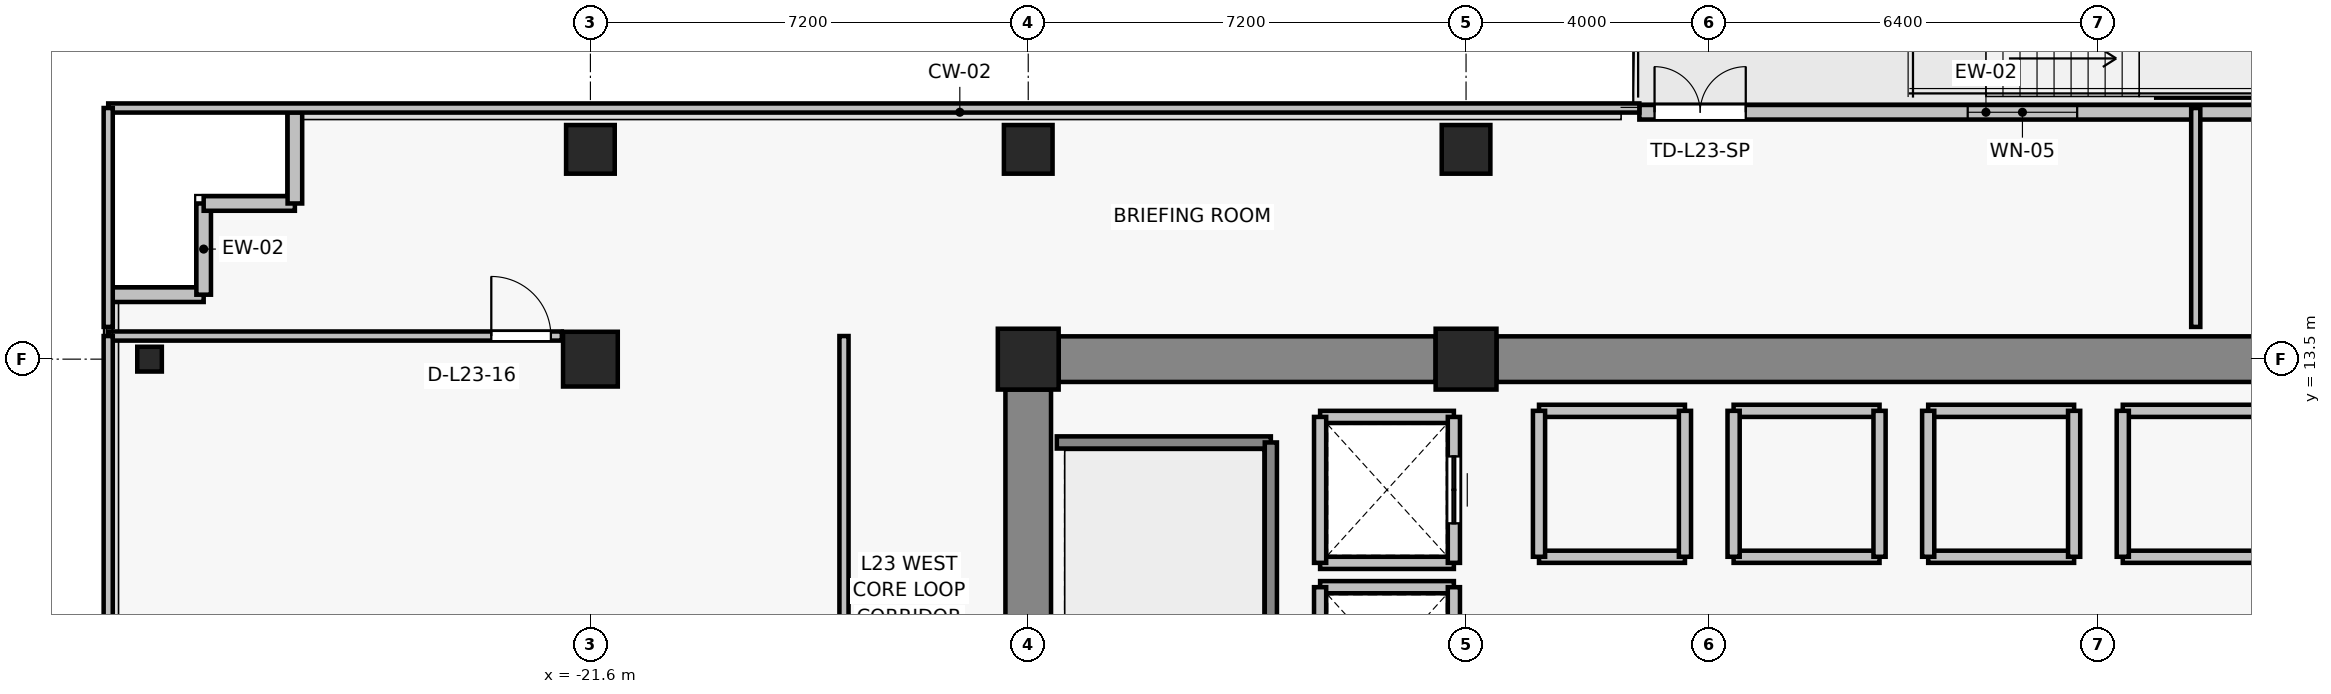
"""IFC4 building model, lengths in metres.
Left out: names, types, materials, properties, quantities, classifications, styles, units other than length and angle.
Written with IfcOpenShell. Run it as: python <this file> out.ifc"""

import sys

from ifc_helpers import new_model, si_unit, direction, frame, frame_2d, origin, origin_2d, place, context, subcontext, project, spatial, rectangle, i_section, extrude, source, transform, mapped, element, fill, save


model = new_model("IFC4")
c1 = context("Model", 3, precision=1e-05, world=origin(), true_north=direction((0.0, 1.0)))
c2 = subcontext(c1, "Body", "Model", "MODEL_VIEW")
j1 = project(units=[si_unit("LENGTHUNIT", "METRE"), si_unit("PLANEANGLEUNIT", "RADIAN")], contexts=[c1])
p1 = place(None, origin())
s1 = spatial("IfcSite", under=j1, at=p1, CompositionType="ELEMENT")
p2 = place(p1, origin())
s2 = spatial("IfcBuilding", under=s1, at=p2, CompositionType="ELEMENT")
p3 = place(p2, frame((0.0, 0.0, 86.8)))
s3 = spatial("IfcBuildingStorey", under=s2, at=p3, CompositionType="ELEMENT", Elevation=86.8)
for number, where, z_axis, x_axis in (
    (1, (-14.4, 13.5, 0.0), (0.0, 0.0, 1.0), (1.0, 0.0, 0.0)),
    (2, (-7.2, 13.5, 0.0), (0.0, 0.0, 1.0), (1.0, 0.0, 0.0)),
):
    element("IfcColumn", number, at=place(p3, frame(where, z_axis=z_axis, x_axis=x_axis)), inside=s3, PredefinedType="COLUMN", context=c2, shape_type="SweptSolid", body=[
        extrude(rectangle(XDim=1.0, YDim=1.0, at=origin_2d()), origin(), (0.0, 0.0, 1.0), 3.3),
    ])
p4 = place(p3, frame((-21.6, 13.5, 0.0), z_axis=(0.0, 0.0, 1.0), x_axis=(1.0, 0.0, 0.0)))
e3 = element("IfcColumn", 3, at=p4, inside=s3, PredefinedType="COLUMN", context=c2, shape_type="SweptSolid", body=[
    extrude(rectangle(XDim=0.9, YDim=0.9, at=origin_2d()), origin(), (0.0, 0.0, 1.0), 3.3),
])
for number, where, z_axis, x_axis in (
    (4, (-14.4, 16.95, 0.0), (0.0, 0.0, 1.0), (1.0, 0.0, 0.0)),
    (5, (-7.2, 16.95, 0.0), (0.0, 0.0, 1.0), (1.0, 0.0, 0.0)),
    (6, (-21.6, 16.95, 0.0), (0.0, 0.0, 1.0), (1.0, 0.0, 0.0)),
):
    element("IfcColumn", number, at=place(p3, frame(where, z_axis=z_axis, x_axis=x_axis)), inside=s3, PredefinedType="COLUMN", context=c2, shape_type="SweptSolid", body=[
        extrude(rectangle(XDim=0.8, YDim=0.8, at=origin_2d()), origin(), (0.0, 0.0, 1.0), 3.3),
    ])
p5 = place(p3, frame((-28.85, 13.5, 0.0), z_axis=(0.0, 0.0, 1.0), x_axis=(1.0, 0.0, 0.0)))
e7 = element("IfcColumn", 7, at=p5, inside=s3, PredefinedType="COLUMN", context=c2, shape_type="SweptSolid", body=[
    extrude(i_section(OverallWidth=0.404, OverallDepth=0.407, WebThickness=0.022, FlangeThickness=0.032, FilletRadius=0.015, at=origin_2d()), origin(), (0.0, 0.0, 1.0), 3.3),
])
p6 = place(p3, frame((-13.9, 13.5, 0.0), z_axis=(0.0, 0.0, 1.0), x_axis=(1.0, 0.0, 0.0)))
e8 = element("IfcWall", 8, at=p6, inside=s3, PredefinedType="SHEAR", context=c2, shape_type="SweptSolid", body=[
    extrude(rectangle(XDim=6.2, YDim=0.75, at=frame_2d((3.1, 0.0))), origin(), (0.0, 0.0, 1.0), 3.075),
])
p7 = place(p3, frame((-6.7, 13.5, 0.0), z_axis=(0.0, 0.0, 1.0), x_axis=(1.0, 0.0, 0.0)))
e9 = element("IfcWall", 9, at=p7, inside=s3, PredefinedType="SHEAR", context=c2, shape_type="SweptSolid", body=[
    extrude(rectangle(XDim=13.4, YDim=0.75, at=frame_2d((6.7, 0.0))), origin(), (0.0, 0.0, 1.0), 3.075),
])
p8 = place(p3, frame((-14.4, 7.1, 0.0), z_axis=(0.0, 0.0, 1.0), x_axis=(0.0, 1.0, 0.0)))
e10 = element("IfcWall", 10, at=p8, inside=s3, PredefinedType="SHEAR", context=c2, shape_type="SweptSolid", body=[
    extrude(rectangle(XDim=5.9, YDim=0.75, at=frame_2d((2.95, 0.0))), origin(), (0.0, 0.0, 1.0), 3.075),
])
p9 = place(p3, frame((-4.35, 17.56, 0.0), z_axis=(0.0, 0.0, 1.0), x_axis=(1.0, 0.0, 0.0)))
e11 = element("IfcWall", 11, at=p9, inside=s3, PredefinedType="SOLIDWALL", context=c2, shape_type="SweptSolid", body=[
    extrude(rectangle(XDim=11.4, YDim=0.24, at=frame_2d((5.7, 0.0))), origin(), (0.0, 0.0, 1.0), 2.59),
])
p10 = place(p9, frame((0.25, 0.0, 0.0)))
e12 = element("IfcOpeningElement", 12, at=p10, cuts=e11, PredefinedType="OPENING", context=c2, shape_type="SweptSolid", body=[
    extrude(rectangle(XDim=1.5, YDim=2.2, at=frame_2d((0.75, 1.1))), frame((0.0, 0.13, 0.0), z_axis=(0.0, -1.0, 0.0), x_axis=(1.0, 0.0, 0.0)), (0.0, 0.0, 1.0), 0.26),
])
p11 = place(p9, frame((5.4, 0.0, 0.85)))
e13 = element("IfcOpeningElement", 13, at=p11, cuts=e11, PredefinedType="OPENING", context=c2, shape_type="SweptSolid", body=[
    extrude(rectangle(XDim=1.8, YDim=1.6, at=frame_2d((0.9, 0.8))), frame((0.0, 0.13, 0.0), z_axis=(0.0, -1.0, 0.0), x_axis=(1.0, 0.0, 0.0)), (0.0, 0.0, 1.0), 0.26),
])
for number, where, z_axis, x_axis in (
    (14, (-27.96, 14.56, 0.0), (0.0, 0.0, 1.0), (-1.0, 0.0, 0.0)),
    (15, (-27.96, 16.06, 0.0), (0.0, 0.0, 1.0), (0.0, -1.0, 0.0)),
    (16, (-26.46, 16.06, 0.0), (0.0, 0.0, 1.0), (-1.0, 0.0, 0.0)),
    (17, (-26.46, 17.56, 0.0), (0.0, 0.0, 1.0), (0.0, -1.0, 0.0)),
):
    element("IfcWall", number, at=place(p3, frame(where, z_axis=z_axis, x_axis=x_axis)), inside=s3, PredefinedType="SOLIDWALL", context=c2, shape_type="SweptSolid", body=[
        extrude(rectangle(XDim=1.5, YDim=0.24, at=frame_2d((0.75, 0.0))), origin(), (0.0, 0.0, 1.0), 3.075),
    ])
p12 = place(p3, frame((4.15, 17.9, -0.25), z_axis=(0.0, 0.0, 1.0), x_axis=(1.0, 0.0, 0.0)))
e18 = element("IfcWall", 18, at=p12, inside=s3, PredefinedType="SOLIDWALL", context=c2, shape_type="SweptSolid", body=[
    extrude(rectangle(XDim=2.33, YDim=0.2, at=frame_2d((1.165, 0.0))), origin(), (0.0, 0.0, 1.0), 1.7),
])
for number, where, z_axis, x_axis in (
    (19, (-3.6, 10.25, 0.0), (0.0, 0.0, 1.0), (-1.0, 0.0, 0.0)),
    (20, (-6.0, 12.65, 0.0), (0.0, 0.0, 1.0), (1.0, 0.0, 0.0)),
):
    element("IfcWall", number, at=place(p3, frame(where, z_axis=z_axis, x_axis=x_axis)), inside=s3, PredefinedType="SOLIDWALL", context=c2, shape_type="SweptSolid", body=[
        extrude(rectangle(XDim=2.4, YDim=0.2, at=frame_2d((1.2, 0.0))), origin(), (0.0, 0.0, 1.0), 2.59),
    ])
for number, where, z_axis, x_axis in (
    (21, (-6.0, 10.25, 0.0), (0.0, 0.0, 1.0), (0.0, 1.0, 0.0)),
    (22, (-3.6, 12.65, 0.0), (0.0, 0.0, 1.0), (0.0, -1.0, 0.0)),
):
    element("IfcWall", number, at=place(p3, frame(where, z_axis=z_axis, x_axis=x_axis)), inside=s3, PredefinedType="SOLIDWALL", context=c2, shape_type="SweptSolid", body=[
        extrude(rectangle(XDim=2.4, YDim=0.2, at=frame_2d((1.2, 0.0))), origin(), (0.0, 0.0, 1.0), 3.075),
    ])
for number, where, z_axis, x_axis in (
    (23, (-0.4, 10.25, 0.0), (0.0, 0.0, 1.0), (-1.0, 0.0, 0.0)),
    (24, (-2.8, 12.65, 0.0), (0.0, 0.0, 1.0), (1.0, 0.0, 0.0)),
):
    element("IfcWall", number, at=place(p3, frame(where, z_axis=z_axis, x_axis=x_axis)), inside=s3, PredefinedType="SOLIDWALL", context=c2, shape_type="SweptSolid", body=[
        extrude(rectangle(XDim=2.4, YDim=0.2, at=frame_2d((1.2, 0.0))), origin(), (0.0, 0.0, 1.0), 3.075),
    ])
for number, where, z_axis, x_axis in (
    (25, (-2.8, 10.25, 0.0), (0.0, 0.0, 1.0), (0.0, 1.0, 0.0)),
    (26, (-0.4, 12.65, 0.0), (0.0, 0.0, 1.0), (0.0, -1.0, 0.0)),
):
    element("IfcWall", number, at=place(p3, frame(where, z_axis=z_axis, x_axis=x_axis)), inside=s3, PredefinedType="SOLIDWALL", context=c2, shape_type="SweptSolid", body=[
        extrude(rectangle(XDim=2.4, YDim=0.2, at=frame_2d((1.2, 0.0))), origin(), (0.0, 0.0, 1.0), 3.075),
    ])
for number, where, z_axis, x_axis in (
    (27, (2.8, 10.25, 0.0), (0.0, 0.0, 1.0), (-1.0, 0.0, 0.0)),
    (28, (0.4, 12.65, 0.0), (0.0, 0.0, 1.0), (1.0, 0.0, 0.0)),
):
    element("IfcWall", number, at=place(p3, frame(where, z_axis=z_axis, x_axis=x_axis)), inside=s3, PredefinedType="SOLIDWALL", context=c2, shape_type="SweptSolid", body=[
        extrude(rectangle(XDim=2.4, YDim=0.2, at=frame_2d((1.2, 0.0))), origin(), (0.0, 0.0, 1.0), 3.075),
    ])
for number, where, z_axis, x_axis in (
    (29, (0.4, 10.25, 0.0), (0.0, 0.0, 1.0), (0.0, 1.0, 0.0)),
    (30, (2.8, 12.65, 0.0), (0.0, 0.0, 1.0), (0.0, -1.0, 0.0)),
    (31, (6.0, 10.25, 0.0), (0.0, 0.0, 1.0), (-1.0, 0.0, 0.0)),
    (32, (3.6, 12.65, 0.0), (0.0, 0.0, 1.0), (1.0, 0.0, 0.0)),
    (33, (3.6, 10.25, 0.0), (0.0, 0.0, 1.0), (0.0, 1.0, 0.0)),
):
    element("IfcWall", number, at=place(p3, frame(where, z_axis=z_axis, x_axis=x_axis)), inside=s3, PredefinedType="SOLIDWALL", context=c2, shape_type="SweptSolid", body=[
        extrude(rectangle(XDim=2.4, YDim=0.2, at=frame_2d((1.2, 0.0))), origin(), (0.0, 0.0, 1.0), 3.075),
    ])
p13 = place(p3, frame((-9.6, 9.75, 0.0), z_axis=(0.0, 0.0, 1.0), x_axis=(1.0, 0.0, 0.0)))
e34 = element("IfcWall", 34, at=p13, inside=s3, PredefinedType="SOLIDWALL", context=c2, shape_type="SweptSolid", body=[
    extrude(rectangle(XDim=2.2, YDim=0.2, at=frame_2d((1.1, 0.0))), origin(), (0.0, 0.0, 1.0), 2.515),
])
p14 = place(p3, frame((-9.6, 7.35, 0.0), z_axis=(0.0, 0.0, 1.0), x_axis=(0.0, 1.0, 0.0)))
e35 = element("IfcWall", 35, at=p14, inside=s3, PredefinedType="SOLIDWALL", context=c2, shape_type="SweptSolid", body=[
    extrude(rectangle(XDim=2.4, YDim=0.2, at=frame_2d((1.2, 0.0))), origin(), (0.0, 0.0, 1.0), 3.075),
])
p15 = place(p3, frame((-7.4, 9.75, 0.0), z_axis=(0.0, 0.0, 1.0), x_axis=(0.0, -1.0, 0.0)))
e36 = element("IfcWall", 36, at=p15, inside=s3, PredefinedType="SOLIDWALL", context=c2, shape_type="SweptSolid", body=[
    extrude(rectangle(XDim=2.4, YDim=0.2, at=frame_2d((1.2, 0.0))), origin(), (0.0, 0.0, 1.0), 2.515),
])
p16 = place(p15, frame((0.65, 0.0, 0.0)))
e37 = element("IfcOpeningElement", 37, at=p16, cuts=e36, PredefinedType="OPENING", context=c2, shape_type="SweptSolid", body=[
    extrude(rectangle(XDim=1.1, YDim=2.2, at=frame_2d((0.55, 1.1))), frame((0.0, 0.11, 0.0), z_axis=(0.0, -1.0, 0.0), x_axis=(1.0, 0.0, 0.0)), (0.0, 0.0, 1.0), 0.22),
])
for number, where, z_axis, x_axis in (
    (38, (-7.4, 10.15, 0.0), (0.0, 0.0, 1.0), (-1.0, 0.0, 0.0)),
    (39, (-9.6, 12.55, 0.0), (0.0, 0.0, 1.0), (1.0, 0.0, 0.0)),
):
    element("IfcWall", number, at=place(p3, frame(where, z_axis=z_axis, x_axis=x_axis)), inside=s3, PredefinedType="SOLIDWALL", context=c2, shape_type="SweptSolid", body=[
        extrude(rectangle(XDim=2.2, YDim=0.2, at=frame_2d((1.1, 0.0))), origin(), (0.0, 0.0, 1.0), 2.515),
    ])
p17 = place(p3, frame((-9.6, 10.15, 0.0), z_axis=(0.0, 0.0, 1.0), x_axis=(0.0, 1.0, 0.0)))
e40 = element("IfcWall", 40, at=p17, inside=s3, PredefinedType="SOLIDWALL", context=c2, shape_type="SweptSolid", body=[
    extrude(rectangle(XDim=2.4, YDim=0.2, at=frame_2d((1.2, 0.0))), origin(), (0.0, 0.0, 1.0), 3.075),
])
p18 = place(p3, frame((-7.4, 12.55, 0.0), z_axis=(0.0, 0.0, 1.0), x_axis=(0.0, -1.0, 0.0)))
e41 = element("IfcWall", 41, at=p18, inside=s3, PredefinedType="SOLIDWALL", context=c2, shape_type="SweptSolid", body=[
    extrude(rectangle(XDim=2.4, YDim=0.2, at=frame_2d((1.2, 0.0))), origin(), (0.0, 0.0, 1.0), 2.515),
])
p19 = place(p18, frame((0.65, 0.0, 0.0)))
e42 = element("IfcOpeningElement", 42, at=p19, cuts=e41, PredefinedType="OPENING", context=c2, shape_type="SweptSolid", body=[
    extrude(rectangle(XDim=1.1, YDim=2.2, at=frame_2d((0.55, 1.1))), frame((0.0, 0.11, 0.0), z_axis=(0.0, -1.0, 0.0), x_axis=(1.0, 0.0, 0.0)), (0.0, 0.0, 1.0), 0.22),
])
p20 = place(p3, frame((-13.93, 12.13, 0.0), z_axis=(0.0, 0.0, 1.0), x_axis=(1.0, 0.0, 0.0)))
e43 = element("IfcWall", 43, at=p20, inside=s3, PredefinedType="SOLIDWALL", context=c2, shape_type="SweptSolid", body=[
    extrude(rectangle(XDim=3.52, YDim=0.2, at=frame_2d((1.76, 0.0))), origin(), (0.0, 0.0, 1.0), 3.075),
])
p21 = place(p3, frame((-10.41, 12.13, 0.0), z_axis=(0.0, 0.0, 1.0), x_axis=(0.0, -1.0, 0.0)))
e44 = element("IfcWall", 44, at=p21, inside=s3, PredefinedType="SOLIDWALL", context=c2, shape_type="SweptSolid", body=[
    extrude(rectangle(XDim=8.84, YDim=0.2, at=frame_2d((4.42, 0.0))), origin(), (0.0, 0.0, 1.0), 3.075),
])
p22 = place(p3, frame((-29.53, 13.88, 0.0), z_axis=(0.0, 0.0, 1.0), x_axis=(1.0, 0.0, 0.0)))
e45 = element("IfcWall", 45, at=p22, inside=s3, PredefinedType="PARTITIONING", context=c2, shape_type="SweptSolid", body=[
    extrude(rectangle(XDim=7.46, YDim=0.15, at=frame_2d((3.73, 0.0))), origin(), (0.0, 0.0, 1.0), 3.075),
])
p23 = place(p22, frame((6.3, 0.0, 0.0)))
e46 = element("IfcOpeningElement", 46, at=p23, cuts=e45, PredefinedType="OPENING", context=c2, shape_type="SweptSolid", body=[
    extrude(rectangle(XDim=0.98, YDim=2.15, at=frame_2d((0.49, 1.075))), frame((0.0, 0.085, 0.0), z_axis=(0.0, -1.0, 0.0), x_axis=(1.0, 0.0, 0.0)), (0.0, 0.0, 1.0), 0.17),
])
p24 = place(p3, frame((-29.53, -1.77, 0.0), z_axis=(0.0, 0.0, 1.0), x_axis=(0.0, 1.0, 0.0)))
e47 = element("IfcWall", 47, at=p24, inside=s3, PredefinedType="PARTITIONING", context=c2, shape_type="SweptSolid", body=[
    extrude(rectangle(XDim=15.65, YDim=0.15, at=frame_2d((7.825, 0.0))), origin(), (0.0, 0.0, 1.0), 3.075),
])
p25 = place(p3, frame((-17.43, 13.88, 0.0), z_axis=(0.0, 0.0, 1.0), x_axis=(0.0, -1.0, 0.0)))
e48 = element("IfcWall", 48, at=p25, inside=s3, PredefinedType="PARTITIONING", context=c2, shape_type="SweptSolid", body=[
    extrude(rectangle(XDim=15.65, YDim=0.15, at=frame_2d((7.825, 0.0))), origin(), (0.0, 0.0, 1.0), 2.515),
])
p26 = place(p25, frame((7.335, 0.0, 0.0)))
e49 = element("IfcOpeningElement", 49, at=p26, cuts=e48, PredefinedType="OPENING", context=c2, shape_type="SweptSolid", body=[
    extrude(rectangle(XDim=0.98, YDim=2.15, at=frame_2d((0.49, 1.075))), frame((0.0, 0.085, 0.0), z_axis=(0.0, -1.0, 0.0), x_axis=(1.0, 0.0, 0.0)), (0.0, 0.0, 1.0), 0.17),
])
p27 = place(p3, frame((-29.53, 17.63, 0.0), z_axis=(0.0, 0.0, 1.0), x_axis=(1.0, 0.0, 0.0)))
e50 = element("IfcWall", 50, at=p27, inside=s3, PredefinedType="PARTITIONING", context=c2, shape_type="SweptSolid", body=[
    extrude(rectangle(XDim=25.18, YDim=0.15, at=frame_2d((12.59, 0.0))), origin(), (0.0, 0.0, 1.0), 2.59),
])
p28 = place(p3, frame((-29.53, 14.03, 0.0), z_axis=(0.0, 0.0, 1.0), x_axis=(0.0, 1.0, 0.0)))
e51 = element("IfcWall", 51, at=p28, inside=s3, PredefinedType="PARTITIONING", context=c2, shape_type="SweptSolid", body=[
    extrude(rectangle(XDim=3.6, YDim=0.15, at=frame_2d((1.8, 0.0))), origin(), (0.0, 0.0, 1.0), 3.075),
])
p29 = place(p3, frame((4.8, 17.63, 0.0), z_axis=(0.0, 0.0, 1.0), x_axis=(0.0, -1.0, 0.0)))
e52 = element("IfcWall", 52, at=p29, inside=s3, PredefinedType="PARTITIONING", context=c2, shape_type="SweptSolid", body=[
    extrude(rectangle(XDim=3.6, YDim=0.15, at=frame_2d((1.8, 0.0))), origin(), (0.0, 0.0, 1.0), 2.565),
])
m1 = source(origin(), c2, "Body", "SweptSolid", [
    extrude(rectangle(XDim=1.5, YDim=2.2, at=frame_2d((0.75, 1.1))), frame((0.0, 0.025, 0.0), z_axis=(0.0, -1.0, 0.0), x_axis=(1.0, 0.0, 0.0)), (0.0, 0.0, 1.0), 0.05),
])
p30 = place(p10, origin())
e53 = element("IfcDoor", 53, at=p30, inside=s3, OperationType="DOUBLE_DOOR_SINGLE_SWING", PredefinedType="DOOR", context=c2, shape_type="MappedRepresentation", body=[
    mapped(m1, transform((0.0, 0.0, 0.0), x_axis=(1.0, 0.0, 0.0), y_axis=(0.0, 1.0, 0.0), z_axis=(0.0, 0.0, 1.0), scale=1.0)),
])
fill(e12, e53)
m2 = source(origin(), c2, "Body", "SweptSolid", [
    extrude(rectangle(XDim=1.8, YDim=1.6, at=frame_2d((0.9, 0.8))), frame((0.0, 0.03, 0.0), z_axis=(0.0, -1.0, 0.0), x_axis=(1.0, 0.0, 0.0)), (0.0, 0.0, 1.0), 0.06),
])
p31 = place(p11, origin())
e54 = element("IfcWindow", 54, at=p31, inside=s3, PartitioningType="SINGLE_PANEL", PredefinedType="WINDOW", context=c2, shape_type="MappedRepresentation", body=[
    mapped(m2, transform((0.0, 0.0, 0.0), x_axis=(1.0, 0.0, 0.0), y_axis=(0.0, 1.0, 0.0), z_axis=(0.0, 0.0, 1.0), scale=1.0)),
])
fill(e13, e54)
m3 = source(origin(), c2, "Body", "SweptSolid", [
    extrude(rectangle(XDim=1.1, YDim=2.2, at=frame_2d((0.55, 1.1))), frame((0.0, 0.025, 0.0), z_axis=(0.0, -1.0, 0.0), x_axis=(1.0, 0.0, 0.0)), (0.0, 0.0, 1.0), 0.05),
])
p32 = place(p19, origin())
e55 = element("IfcDoor", 55, at=p32, inside=s3, OperationType="DOUBLE_DOOR_SLIDING", PredefinedType="DOOR", context=c2, shape_type="MappedRepresentation", body=[
    mapped(m3, transform((0.0, 0.0, 0.0), x_axis=(1.0, 0.0, 0.0), y_axis=(0.0, 1.0, 0.0), z_axis=(0.0, 0.0, 1.0), scale=1.0)),
])
fill(e42, e55)
m4 = source(origin(), c2, "Body", "SweptSolid", [
    extrude(rectangle(XDim=0.98, YDim=2.15, at=frame_2d((0.49, 1.075))), frame((0.0, 0.025, 0.0), z_axis=(0.0, -1.0, 0.0), x_axis=(1.0, 0.0, 0.0)), (0.0, 0.0, 1.0), 0.05),
])
p33 = place(p23, origin())
e56 = element("IfcDoor", 56, at=p33, inside=s3, OperationType="SINGLE_SWING_LEFT", PredefinedType="DOOR", context=c2, shape_type="MappedRepresentation", body=[
    mapped(m4, transform((0.0, 0.0, 0.0), x_axis=(1.0, 0.0, 0.0), y_axis=(0.0, 1.0, 0.0), z_axis=(0.0, 0.0, 1.0), scale=1.0)),
])
fill(e46, e56)
save(model, sys.argv[1])
